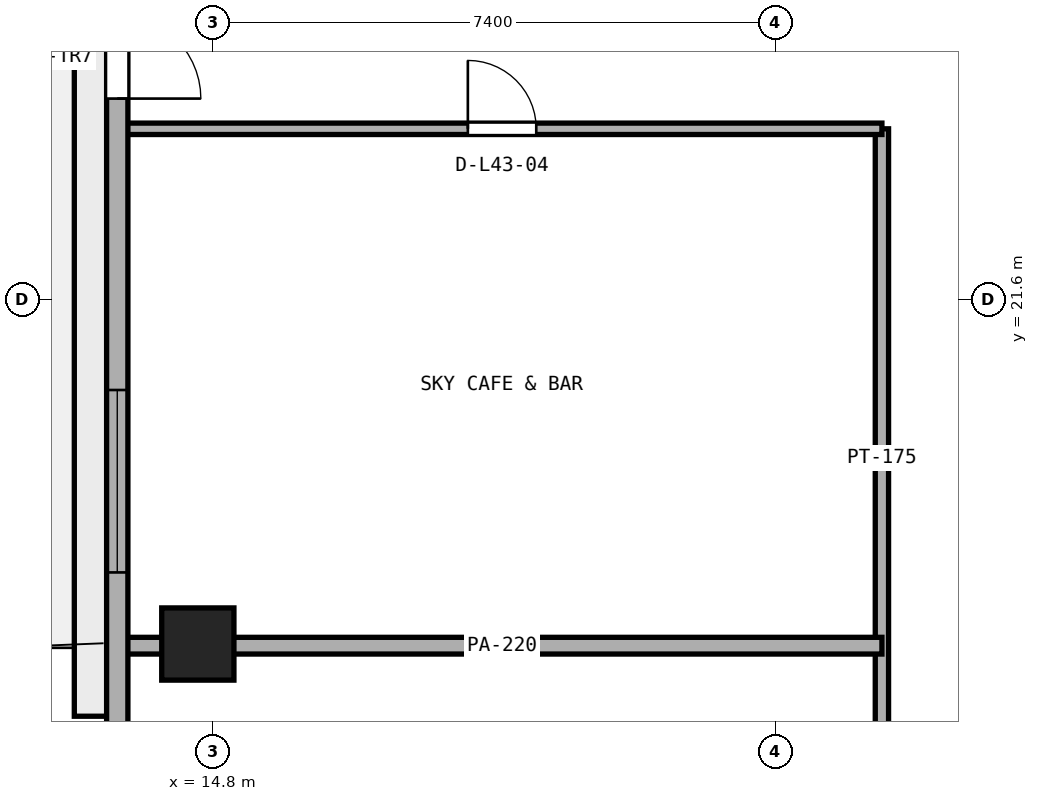
"""IFC4 building model, lengths in metres.
Left out: names, types, materials, properties, quantities, classifications, styles, units other than length and angle.
Written with IfcOpenShell. Run it as: python <this file> out.ifc"""

import sys

from ifc_helpers import new_model, si_unit, direction, frame, frame_2d, origin, origin_2d, place, context, subcontext, project, spatial, rectangle, extrude, element, fill, save


model = new_model("IFC4")
c1 = context("Model", 3, precision=1e-05, world=origin(), true_north=direction((0.0, 1.0)))
c2 = subcontext(c1, "Body", "Model", "MODEL_VIEW")
j1 = project(units=[si_unit("LENGTHUNIT", "METRE"), si_unit("PLANEANGLEUNIT", "RADIAN")], contexts=[c1])
p1 = place(None, origin())
s1 = spatial("IfcSite", under=j1, at=p1, CompositionType="ELEMENT")
p2 = place(p1, origin())
s2 = spatial("IfcBuilding", under=s1, at=p2, CompositionType="ELEMENT")
p3 = place(p2, frame((0.0, 0.0, 170.6)))
s3 = spatial("IfcBuildingStorey", under=s2, at=p3, CompositionType="ELEMENT", Elevation=170.6)
p4 = place(p3, frame((14.6, 17.072, 0.0), z_axis=(0.0, 0.0, 1.0), x_axis=(1.0, 0.0, 0.0)))
e1 = element("IfcColumn", 1, at=p4, inside=s3, PredefinedType="COLUMN", context=c2, shape_type="SweptSolid", body=[
    extrude(rectangle(XDim=0.95, YDim=0.95, at=origin_2d()), origin(), (0.0, 0.0, 1.0), 3.8),
])
p5 = place(p3, frame((23.6, 15.2, 0.0), z_axis=(0.0, 0.0, 1.0), x_axis=(0.0, 1.0, 0.0)))
e2 = element("IfcWall", 2, at=p5, inside=s3, PredefinedType="PARTITIONING", context=c2, shape_type="SweptSolid", body=[
    extrude(rectangle(XDim=8.65, YDim=0.175, at=frame_2d((4.325, 0.0))), origin(), (0.0, 0.0, 1.0), 3.54),
])
p6 = place(p3, frame((13.605, 17.05, 0.0), z_axis=(0.0, 0.0, 1.0), x_axis=(1.0, 0.0, 0.0)))
e3 = element("IfcWall", 3, at=p6, inside=s3, PredefinedType="PARTITIONING", context=c2, shape_type="SweptSolid", body=[
    extrude(rectangle(XDim=9.995, YDim=0.22, at=frame_2d((4.998, 0.0))), origin(), (0.0, 0.0, 1.0), 2.923),
])
p7 = place(p3, frame((13.605, 23.85, 0.0), z_axis=(0.0, 0.0, 1.0), x_axis=(1.0, 0.0, 0.0)))
e4 = element("IfcWall", 4, at=p7, inside=s3, PredefinedType="PARTITIONING", context=c2, shape_type="SweptSolid", body=[
    extrude(rectangle(XDim=9.995, YDim=0.15, at=frame_2d((4.998, 0.0))), origin(), (0.0, 0.0, 1.0), 3.54),
])
p8 = place(p7, frame((4.548, 0.0, 0.0)))
e5 = element("IfcOpeningElement", 5, at=p8, cuts=e4, PredefinedType="OPENING", context=c2, shape_type="SweptSolid", body=[
    extrude(rectangle(XDim=0.9, YDim=2.1, at=frame_2d((0.45, 1.05))), frame((0.0, 0.085, 0.0), z_axis=(0.0, -1.0, 0.0), x_axis=(1.0, 0.0, 0.0)), (0.0, 0.0, 1.0), 0.17),
])
p9 = place(p3, frame((13.54, 33.673, 0.0), z_axis=(0.0, 0.0, 1.0), x_axis=(0.0, -1.0, 0.0)))
e6 = element("IfcWall", 6, at=p9, inside=s3, PredefinedType="STANDARD", context=c2, shape_type="SweptSolid", body=[
    extrude(rectangle(XDim=17.751, YDim=0.28, at=frame_2d((8.875, 0.0))), origin(), (0.0, 0.0, 1.0), 3.54),
])
p10 = place(p9, frame((8.326, 0.0, 0.0)))
e7 = element("IfcOpeningElement", 7, at=p10, cuts=e6, PredefinedType="OPENING", context=c2, shape_type="SweptSolid", body=[
    extrude(rectangle(XDim=1.1, YDim=2.2, at=frame_2d((0.55, 1.1))), frame((0.0, 0.15, 0.0), z_axis=(0.0, -1.0, 0.0), x_axis=(1.0, 0.0, 0.0)), (0.0, 0.0, 1.0), 0.3),
])
p11 = place(p9, frame((2.092, 0.0, 0.9)))
e8 = element("IfcOpeningElement", 8, at=p11, cuts=e6, PredefinedType="OPENING", context=c2, shape_type="SweptSolid", body=[
    extrude(rectangle(XDim=2.4, YDim=1.75, at=frame_2d((1.2, 0.875))), frame((0.0, 0.15, 0.0), z_axis=(0.0, -1.0, 0.0), x_axis=(1.0, 0.0, 0.0)), (0.0, 0.0, 1.0), 0.3),
])
p12 = place(p9, frame((13.26, 0.0, 0.9)))
e9 = element("IfcOpeningElement", 9, at=p12, cuts=e6, PredefinedType="OPENING", context=c2, shape_type="SweptSolid", body=[
    extrude(rectangle(XDim=2.4, YDim=1.75, at=frame_2d((1.2, 0.875))), frame((0.0, 0.15, 0.0), z_axis=(0.0, -1.0, 0.0), x_axis=(1.0, 0.0, 0.0)), (0.0, 0.0, 1.0), 0.3),
])
p13 = place(p8, origin())
e10 = element("IfcDoor", 10, at=p13, inside=s3, OperationType="SINGLE_SWING_LEFT", PredefinedType="DOOR", context=c2, shape_type="SweptSolid", body=[
    extrude(rectangle(XDim=0.9, YDim=2.1, at=frame_2d((0.45, 1.05))), frame((0.0, 0.025, 0.0), z_axis=(0.0, -1.0, 0.0), x_axis=(1.0, 0.0, 0.0)), (0.0, 0.0, 1.0), 0.05),
])
fill(e5, e10)
p14 = place(p10, origin())
e11 = element("IfcDoor", 11, at=p14, inside=s3, OperationType="SINGLE_SWING_RIGHT", PredefinedType="DOOR", context=c2, shape_type="SweptSolid", body=[
    extrude(rectangle(XDim=1.1, YDim=2.2, at=frame_2d((0.55, 1.1))), frame((0.0, 0.025, 0.0), z_axis=(0.0, -1.0, 0.0), x_axis=(1.0, 0.0, 0.0)), (0.0, 0.0, 1.0), 0.05),
])
fill(e7, e11)
p15 = place(p12, origin())
e12 = element("IfcWindow", 12, at=p15, inside=s3, PartitioningType="SINGLE_PANEL", PredefinedType="WINDOW", context=c2, shape_type="SweptSolid", body=[
    extrude(rectangle(XDim=2.4, YDim=1.75, at=frame_2d((1.2, 0.875))), frame((0.0, 0.03, 0.0), z_axis=(0.0, -1.0, 0.0), x_axis=(1.0, 0.0, 0.0)), (0.0, 0.0, 1.0), 0.06),
])
fill(e9, e12)
save(model, sys.argv[1])
